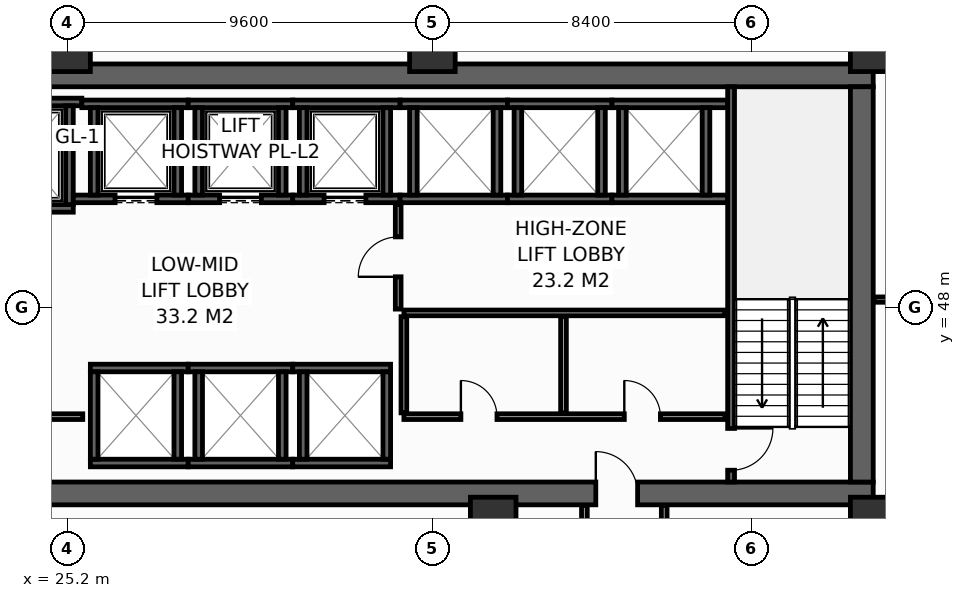
"""IFC4 building model, lengths in metres.
Left out: names, types, materials, properties, quantities, classifications, styles, units other than length and angle.
Written with IfcOpenShell. Run it as: python <this file> out.ifc"""

import sys

from ifc_helpers import new_model, si_unit, direction, frame, frame_2d, origin, origin_2d, place, context, subcontext, project, spatial, rectangle, hollow_rectangle, extrude, element, fill, save


model = new_model("IFC4")
c1 = context("Model", 3, precision=1e-05, world=origin(), true_north=direction((0.0, 1.0)))
c2 = subcontext(c1, "Body", "Model", "MODEL_VIEW")
j1 = project(units=[si_unit("LENGTHUNIT", "METRE"), si_unit("PLANEANGLEUNIT", "RADIAN")], contexts=[c1])
p1 = place(None, origin())
s1 = spatial("IfcSite", under=j1, at=p1, CompositionType="ELEMENT")
p2 = place(p1, origin())
s2 = spatial("IfcBuilding", under=s1, at=p2, CompositionType="ELEMENT")
p3 = place(p2, frame((0.0, 0.0, 56.0)))
s3 = spatial("IfcBuildingStorey", under=s2, at=p3, CompositionType="ELEMENT", Elevation=56.0)
p4 = place(p3, frame((13.5, 43.1, 0.0), z_axis=(0.0, 0.0, 1.0), x_axis=(1.0, 0.0, 0.0)))
e1 = element("IfcWall", 1, at=p4, inside=s3, PredefinedType="SHEAR", context=c2, shape_type="SweptSolid", body=[
    extrude(rectangle(XDim=32.9, YDim=0.6, at=frame_2d((16.45, 0.0))), origin(), (0.0, 0.0, 1.0), 4.15),
])
p5 = place(p4, frame((5.4, 0.0, 0.0)))
e2 = element("IfcOpeningElement", 2, at=p5, cuts=e1, PredefinedType="OPENING", context=c2, shape_type="SweptSolid", body=[
    extrude(rectangle(XDim=1.1, YDim=2.15, at=frame_2d((0.55, 1.075))), frame((0.0, 0.31, 0.0), z_axis=(0.0, -1.0, 0.0), x_axis=(1.0, 0.0, 0.0)), (0.0, 0.0, 1.0), 0.62),
])
p6 = place(p4, frame((25.6, 0.0, 0.0)))
e3 = element("IfcOpeningElement", 3, at=p6, cuts=e1, PredefinedType="OPENING", context=c2, shape_type="SweptSolid", body=[
    extrude(rectangle(XDim=1.1, YDim=2.15, at=frame_2d((0.55, 1.075))), frame((0.0, 0.31, 0.0), z_axis=(0.0, -1.0, 0.0), x_axis=(1.0, 0.0, 0.0)), (0.0, 0.0, 1.0), 0.62),
])
p7 = place(p3, frame((13.5, 54.1, 0.0), z_axis=(0.0, 0.0, 1.0), x_axis=(1.0, 0.0, 0.0)))
e4 = element("IfcWall", 4, at=p7, inside=s3, PredefinedType="SHEAR", context=c2, shape_type="SweptSolid", body=[
    extrude(rectangle(XDim=32.9, YDim=0.6, at=frame_2d((16.45, 0.0))), origin(), (0.0, 0.0, 1.0), 4.15),
])
p8 = place(p3, frame((46.1, 43.4, 0.0), z_axis=(0.0, 0.0, 1.0), x_axis=(0.0, 1.0, 0.0)))
e5 = element("IfcWall", 5, at=p8, inside=s3, PredefinedType="SHEAR", context=c2, shape_type="SweptSolid", body=[
    extrude(rectangle(XDim=10.4, YDim=0.6, at=frame_2d((5.2, 0.0))), origin(), (0.0, 0.0, 1.0), 4.15),
])
for number, where, z_axis, x_axis in (
    (6, (25.2, 54.8, 0.0), (0.0, 0.0, 1.0), (1.0, 0.0, 0.0)),
    (7, (34.8, 54.8, 0.0), (0.0, 0.0, 1.0), (1.0, 0.0, 0.0)),
    (8, (46.4, 54.8, 0.0), (0.0, 0.0, 1.0), (1.0, 0.0, 0.0)),
    (9, (36.4, 42.4, 0.0), (0.0, 0.0, 1.0), (1.0, 0.0, 0.0)),
    (10, (46.4, 42.4, 0.0), (0.0, 0.0, 1.0), (1.0, 0.0, 0.0)),
):
    element("IfcColumn", number, at=place(p3, frame(where, z_axis=z_axis, x_axis=x_axis)), inside=s3, PredefinedType="COLUMN", context=c2, shape_type="SweptSolid", body=[
        extrude(hollow_rectangle(XDim=1.2, YDim=1.2, WallThickness=0.055, at=origin_2d()), origin(), (0.0, 0.0, 1.0), 4.4),
    ])
p9 = place(p3, frame((22.5, 50.6, 0.0), z_axis=(0.0, 0.0, 1.0), x_axis=(1.0, 0.0, 0.0)))
e11 = element("IfcWall", 11, at=p9, inside=s3, PredefinedType="SHEAR", context=c2, shape_type="SweptSolid", body=[
    extrude(rectangle(XDim=2.85, YDim=0.2, at=frame_2d((1.425, 0.0))), origin(), (0.0, 0.0, 1.0), 4.15),
])
p10 = place(p9, frame((0.925, 0.0, 0.0)))
e12 = element("IfcOpeningElement", 12, at=p10, cuts=e11, PredefinedType="OPENING", context=c2, shape_type="SweptSolid", body=[
    extrude(rectangle(XDim=1.25, YDim=2.3, at=frame_2d((0.625, 1.15))), frame((0.0, 0.11, 0.0), z_axis=(0.0, -1.0, 0.0), x_axis=(1.0, 0.0, 0.0)), (0.0, 0.0, 1.0), 0.22),
])
p11 = place(p3, frame((22.5, 53.4, 0.0), z_axis=(0.0, 0.0, 1.0), x_axis=(1.0, 0.0, 0.0)))
e13 = element("IfcWall", 13, at=p11, inside=s3, PredefinedType="SHEAR", context=c2, shape_type="SweptSolid", body=[
    extrude(rectangle(XDim=3.075, YDim=0.2, at=frame_2d((1.538, 0.0))), origin(), (0.0, 0.0, 1.0), 4.15),
])
p12 = place(p3, frame((25.25, 50.7, 0.0), z_axis=(0.0, 0.0, 1.0), x_axis=(0.0, 1.0, 0.0)))
e14 = element("IfcWall", 14, at=p12, inside=s3, PredefinedType="SHEAR", context=c2, shape_type="SweptSolid", body=[
    extrude(rectangle(XDim=2.6, YDim=0.2, at=frame_2d((1.3, 0.0))), origin(), (0.0, 0.0, 1.0), 4.15),
])
p13 = place(p3, frame((25.35, 50.85, 0.0), z_axis=(0.0, 0.0, 1.0), x_axis=(1.0, 0.0, 0.0)))
e15 = element("IfcWall", 15, at=p13, inside=s3, PredefinedType="SHEAR", context=c2, shape_type="SweptSolid", body=[
    extrude(rectangle(XDim=3.025, YDim=0.2, at=frame_2d((1.512, 0.0))), origin(), (0.0, 0.0, 1.0), 4.15),
])
p14 = place(p13, frame((1.1, 0.0, 0.0)))
e16 = element("IfcOpeningElement", 16, at=p14, cuts=e15, PredefinedType="OPENING", context=c2, shape_type="SweptSolid", body=[
    extrude(rectangle(XDim=1.1, YDim=2.2, at=frame_2d((0.55, 1.1))), frame((0.0, 0.11, 0.0), z_axis=(0.0, -1.0, 0.0), x_axis=(1.0, 0.0, 0.0)), (0.0, 0.0, 1.0), 0.22),
])
p15 = place(p3, frame((25.575, 53.35, 0.0), z_axis=(0.0, 0.0, 1.0), x_axis=(1.0, 0.0, 0.0)))
e17 = element("IfcWall", 17, at=p15, inside=s3, PredefinedType="SHEAR", context=c2, shape_type="SweptSolid", body=[
    extrude(rectangle(XDim=2.8, YDim=0.2, at=frame_2d((1.4, 0.0))), origin(), (0.0, 0.0, 1.0), 4.15),
])
for number, where, z_axis, x_axis in (
    (18, (25.9, 50.95, 0.0), (0.0, 0.0, 1.0), (0.0, 1.0, 0.0)),
    (19, (28.1, 50.95, 0.0), (0.0, 0.0, 1.0), (0.0, 1.0, 0.0)),
):
    element("IfcWall", number, at=place(p3, frame(where, z_axis=z_axis, x_axis=x_axis)), inside=s3, PredefinedType="SHEAR", context=c2, shape_type="SweptSolid", body=[
        extrude(rectangle(XDim=2.3, YDim=0.2, at=frame_2d((1.15, 0.0))), origin(), (0.0, 0.0, 1.0), 4.15),
    ])
p16 = place(p3, frame((28.375, 50.85, 0.0), z_axis=(0.0, 0.0, 1.0), x_axis=(1.0, 0.0, 0.0)))
e20 = element("IfcWall", 20, at=p16, inside=s3, PredefinedType="SHEAR", context=c2, shape_type="SweptSolid", body=[
    extrude(rectangle(XDim=2.75, YDim=0.2, at=frame_2d((1.375, 0.0))), origin(), (0.0, 0.0, 1.0), 4.15),
])
p17 = place(p16, frame((0.825, 0.0, 0.0)))
e21 = element("IfcOpeningElement", 21, at=p17, cuts=e20, PredefinedType="OPENING", context=c2, shape_type="SweptSolid", body=[
    extrude(rectangle(XDim=1.1, YDim=2.2, at=frame_2d((0.55, 1.1))), frame((0.0, 0.11, 0.0), z_axis=(0.0, -1.0, 0.0), x_axis=(1.0, 0.0, 0.0)), (0.0, 0.0, 1.0), 0.22),
])
p18 = place(p3, frame((28.375, 53.35, 0.0), z_axis=(0.0, 0.0, 1.0), x_axis=(1.0, 0.0, 0.0)))
e22 = element("IfcWall", 22, at=p18, inside=s3, PredefinedType="SHEAR", context=c2, shape_type="SweptSolid", body=[
    extrude(rectangle(XDim=2.75, YDim=0.2, at=frame_2d((1.375, 0.0))), origin(), (0.0, 0.0, 1.0), 4.15),
])
for number, where, z_axis, x_axis in (
    (23, (28.65, 50.95, 0.0), (0.0, 0.0, 1.0), (0.0, 1.0, 0.0)),
    (24, (30.85, 50.95, 0.0), (0.0, 0.0, 1.0), (0.0, 1.0, 0.0)),
):
    element("IfcWall", number, at=place(p3, frame(where, z_axis=z_axis, x_axis=x_axis)), inside=s3, PredefinedType="SHEAR", context=c2, shape_type="SweptSolid", body=[
        extrude(rectangle(XDim=2.3, YDim=0.2, at=frame_2d((1.15, 0.0))), origin(), (0.0, 0.0, 1.0), 4.15),
    ])
p19 = place(p3, frame((31.125, 50.85, 0.0), z_axis=(0.0, 0.0, 1.0), x_axis=(1.0, 0.0, 0.0)))
e25 = element("IfcWall", 25, at=p19, inside=s3, PredefinedType="SHEAR", context=c2, shape_type="SweptSolid", body=[
    extrude(rectangle(XDim=2.825, YDim=0.2, at=frame_2d((1.413, 0.0))), origin(), (0.0, 0.0, 1.0), 4.15),
])
p20 = place(p19, frame((0.825, 0.0, 0.0)))
e26 = element("IfcOpeningElement", 26, at=p20, cuts=e25, PredefinedType="OPENING", context=c2, shape_type="SweptSolid", body=[
    extrude(rectangle(XDim=1.1, YDim=2.2, at=frame_2d((0.55, 1.1))), frame((0.0, 0.11, 0.0), z_axis=(0.0, -1.0, 0.0), x_axis=(1.0, 0.0, 0.0)), (0.0, 0.0, 1.0), 0.22),
])
p21 = place(p3, frame((31.125, 53.35, 0.0), z_axis=(0.0, 0.0, 1.0), x_axis=(1.0, 0.0, 0.0)))
e27 = element("IfcWall", 27, at=p21, inside=s3, PredefinedType="SHEAR", context=c2, shape_type="SweptSolid", body=[
    extrude(rectangle(XDim=2.825, YDim=0.2, at=frame_2d((1.413, 0.0))), origin(), (0.0, 0.0, 1.0), 4.15),
])
for number, where, z_axis, x_axis in (
    (28, (31.4, 50.95, 0.0), (0.0, 0.0, 1.0), (0.0, 1.0, 0.0)),
    (29, (33.6, 50.95, 0.0), (0.0, 0.0, 1.0), (0.0, 1.0, 0.0)),
):
    element("IfcWall", number, at=place(p3, frame(where, z_axis=z_axis, x_axis=x_axis)), inside=s3, PredefinedType="SHEAR", context=c2, shape_type="SweptSolid", body=[
        extrude(rectangle(XDim=2.3, YDim=0.2, at=frame_2d((1.15, 0.0))), origin(), (0.0, 0.0, 1.0), 4.15),
    ])
for number, where, z_axis, x_axis in (
    (30, (25.8, 43.9, 0.0), (0.0, 0.0, 1.0), (1.0, 0.0, 0.0)),
    (31, (25.8, 46.4, 0.0), (0.0, 0.0, 1.0), (1.0, 0.0, 0.0)),
):
    element("IfcWall", number, at=place(p3, frame(where, z_axis=z_axis, x_axis=x_axis)), inside=s3, PredefinedType="SHEAR", context=c2, shape_type="SweptSolid", body=[
        extrude(rectangle(XDim=2.575, YDim=0.2, at=frame_2d((1.288, 0.0))), origin(), (0.0, 0.0, 1.0), 4.15),
    ])
for number, where, z_axis, x_axis in (
    (32, (25.9, 44.0, 0.0), (0.0, 0.0, 1.0), (0.0, 1.0, 0.0)),
    (33, (28.1, 44.0, 0.0), (0.0, 0.0, 1.0), (0.0, 1.0, 0.0)),
):
    element("IfcWall", number, at=place(p3, frame(where, z_axis=z_axis, x_axis=x_axis)), inside=s3, PredefinedType="SHEAR", context=c2, shape_type="SweptSolid", body=[
        extrude(rectangle(XDim=2.3, YDim=0.2, at=frame_2d((1.15, 0.0))), origin(), (0.0, 0.0, 1.0), 4.15),
    ])
for number, where, z_axis, x_axis in (
    (34, (28.375, 43.9, 0.0), (0.0, 0.0, 1.0), (1.0, 0.0, 0.0)),
    (35, (28.375, 46.4, 0.0), (0.0, 0.0, 1.0), (1.0, 0.0, 0.0)),
):
    element("IfcWall", number, at=place(p3, frame(where, z_axis=z_axis, x_axis=x_axis)), inside=s3, PredefinedType="SHEAR", context=c2, shape_type="SweptSolid", body=[
        extrude(rectangle(XDim=2.75, YDim=0.2, at=frame_2d((1.375, 0.0))), origin(), (0.0, 0.0, 1.0), 4.15),
    ])
for number, where, z_axis, x_axis in (
    (36, (28.65, 44.0, 0.0), (0.0, 0.0, 1.0), (0.0, 1.0, 0.0)),
    (37, (30.85, 44.0, 0.0), (0.0, 0.0, 1.0), (0.0, 1.0, 0.0)),
):
    element("IfcWall", number, at=place(p3, frame(where, z_axis=z_axis, x_axis=x_axis)), inside=s3, PredefinedType="SHEAR", context=c2, shape_type="SweptSolid", body=[
        extrude(rectangle(XDim=2.3, YDim=0.2, at=frame_2d((1.15, 0.0))), origin(), (0.0, 0.0, 1.0), 4.15),
    ])
for number, where, z_axis, x_axis in (
    (38, (31.125, 43.9, 0.0), (0.0, 0.0, 1.0), (1.0, 0.0, 0.0)),
    (39, (31.125, 46.4, 0.0), (0.0, 0.0, 1.0), (1.0, 0.0, 0.0)),
):
    element("IfcWall", number, at=place(p3, frame(where, z_axis=z_axis, x_axis=x_axis)), inside=s3, PredefinedType="SHEAR", context=c2, shape_type="SweptSolid", body=[
        extrude(rectangle(XDim=2.575, YDim=0.2, at=frame_2d((1.288, 0.0))), origin(), (0.0, 0.0, 1.0), 4.15),
    ])
for number, where, z_axis, x_axis in (
    (40, (31.4, 44.0, 0.0), (0.0, 0.0, 1.0), (0.0, 1.0, 0.0)),
    (41, (33.6, 44.0, 0.0), (0.0, 0.0, 1.0), (0.0, 1.0, 0.0)),
):
    element("IfcWall", number, at=place(p3, frame(where, z_axis=z_axis, x_axis=x_axis)), inside=s3, PredefinedType="SHEAR", context=c2, shape_type="SweptSolid", body=[
        extrude(rectangle(XDim=2.3, YDim=0.2, at=frame_2d((1.15, 0.0))), origin(), (0.0, 0.0, 1.0), 4.15),
    ])
for number, where, z_axis, x_axis in (
    (42, (33.95, 50.85, 0.0), (0.0, 0.0, 1.0), (1.0, 0.0, 0.0)),
    (43, (33.95, 53.35, 0.0), (0.0, 0.0, 1.0), (1.0, 0.0, 0.0)),
):
    element("IfcWall", number, at=place(p3, frame(where, z_axis=z_axis, x_axis=x_axis)), inside=s3, PredefinedType="SHEAR", context=c2, shape_type="SweptSolid", body=[
        extrude(rectangle(XDim=2.825, YDim=0.2, at=frame_2d((1.413, 0.0))), origin(), (0.0, 0.0, 1.0), 4.15),
    ])
for number, where, z_axis, x_axis in (
    (44, (34.3, 50.95, 0.0), (0.0, 0.0, 1.0), (0.0, 1.0, 0.0)),
    (45, (36.5, 50.95, 0.0), (0.0, 0.0, 1.0), (0.0, 1.0, 0.0)),
):
    element("IfcWall", number, at=place(p3, frame(where, z_axis=z_axis, x_axis=x_axis)), inside=s3, PredefinedType="SHEAR", context=c2, shape_type="SweptSolid", body=[
        extrude(rectangle(XDim=2.3, YDim=0.2, at=frame_2d((1.15, 0.0))), origin(), (0.0, 0.0, 1.0), 4.15),
    ])
for number, where, z_axis, x_axis in (
    (46, (36.775, 50.85, 0.0), (0.0, 0.0, 1.0), (1.0, 0.0, 0.0)),
    (47, (36.775, 53.35, 0.0), (0.0, 0.0, 1.0), (1.0, 0.0, 0.0)),
):
    element("IfcWall", number, at=place(p3, frame(where, z_axis=z_axis, x_axis=x_axis)), inside=s3, PredefinedType="SHEAR", context=c2, shape_type="SweptSolid", body=[
        extrude(rectangle(XDim=2.75, YDim=0.2, at=frame_2d((1.375, 0.0))), origin(), (0.0, 0.0, 1.0), 4.15),
    ])
for number, where, z_axis, x_axis in (
    (48, (37.05, 50.95, 0.0), (0.0, 0.0, 1.0), (0.0, 1.0, 0.0)),
    (49, (39.25, 50.95, 0.0), (0.0, 0.0, 1.0), (0.0, 1.0, 0.0)),
):
    element("IfcWall", number, at=place(p3, frame(where, z_axis=z_axis, x_axis=x_axis)), inside=s3, PredefinedType="SHEAR", context=c2, shape_type="SweptSolid", body=[
        extrude(rectangle(XDim=2.3, YDim=0.2, at=frame_2d((1.15, 0.0))), origin(), (0.0, 0.0, 1.0), 4.15),
    ])
for number, where, z_axis, x_axis in (
    (50, (39.525, 50.85, 0.0), (0.0, 0.0, 1.0), (1.0, 0.0, 0.0)),
    (51, (39.525, 53.35, 0.0), (0.0, 0.0, 1.0), (1.0, 0.0, 0.0)),
):
    element("IfcWall", number, at=place(p3, frame(where, z_axis=z_axis, x_axis=x_axis)), inside=s3, PredefinedType="SHEAR", context=c2, shape_type="SweptSolid", body=[
        extrude(rectangle(XDim=3.045, YDim=0.2, at=frame_2d((1.522, 0.0))), origin(), (0.0, 0.0, 1.0), 4.15),
    ])
for number, where, z_axis, x_axis in (
    (52, (39.8, 50.95, 0.0), (0.0, 0.0, 1.0), (0.0, 1.0, 0.0)),
    (53, (42.0, 50.95, 0.0), (0.0, 0.0, 1.0), (0.0, 1.0, 0.0)),
):
    element("IfcWall", number, at=place(p3, frame(where, z_axis=z_axis, x_axis=x_axis)), inside=s3, PredefinedType="SHEAR", context=c2, shape_type="SweptSolid", body=[
        extrude(rectangle(XDim=2.3, YDim=0.2, at=frame_2d((1.15, 0.0))), origin(), (0.0, 0.0, 1.0), 4.15),
    ])
p22 = place(p3, frame((42.66, 53.8, 0.0), z_axis=(0.0, 0.0, 1.0), x_axis=(0.0, -1.0, 0.0)))
e54 = element("IfcWall", 54, at=p22, inside=s3, PredefinedType="SHEAR", context=c2, shape_type="SweptSolid", body=[
    extrude(rectangle(XDim=10.4, YDim=0.18, at=frame_2d((5.2, 0.0))), origin(), (0.0, 0.0, 1.0), 4.15),
])
p23 = place(p22, frame((8.99, 0.0, 0.0)))
e55 = element("IfcOpeningElement", 55, at=p23, cuts=e54, PredefinedType="OPENING", context=c2, shape_type="SweptSolid", body=[
    extrude(rectangle(XDim=1.1, YDim=2.15, at=frame_2d((0.55, 1.075))), frame((0.0, 0.1, 0.0), z_axis=(0.0, -1.0, 0.0), x_axis=(1.0, 0.0, 0.0)), (0.0, 0.0, 1.0), 0.2),
])
p24 = place(p3, frame((22.68, 45.12, 0.0), z_axis=(0.0, 0.0, 1.0), x_axis=(1.0, 0.0, 0.0)))
e56 = element("IfcWall", 56, at=p24, inside=s3, PredefinedType="PARTITIONING", context=c2, shape_type="SweptSolid", body=[
    extrude(rectangle(XDim=2.92, YDim=0.15, at=frame_2d((1.46, 0.0))), origin(), (0.0, 0.0, 1.0), 4.15),
])
p25 = place(p24, frame((0.85, 0.0, 0.0)))
e57 = element("IfcOpeningElement", 57, at=p25, cuts=e56, PredefinedType="OPENING", context=c2, shape_type="SweptSolid", body=[
    extrude(rectangle(XDim=1.1, YDim=2.15, at=frame_2d((0.55, 1.075))), frame((0.0, 0.085, 0.0), z_axis=(0.0, -1.0, 0.0), x_axis=(1.0, 0.0, 0.0)), (0.0, 0.0, 1.0), 0.17),
])
p26 = place(p3, frame((33.9, 47.95, 0.0), z_axis=(0.0, 0.0, 1.0), x_axis=(0.0, 1.0, 0.0)))
e58 = element("IfcWall", 58, at=p26, inside=s3, PredefinedType="PARTITIONING", context=c2, shape_type="SweptSolid", body=[
    extrude(rectangle(XDim=2.75, YDim=0.15, at=frame_2d((1.375, 0.0))), origin(), (0.0, 0.0, 1.0), 4.15),
])
p27 = place(p26, frame((0.85, 0.0, 0.0)))
e59 = element("IfcOpeningElement", 59, at=p27, cuts=e58, PredefinedType="OPENING", context=c2, shape_type="SweptSolid", body=[
    extrude(rectangle(XDim=1.05, YDim=2.15, at=frame_2d((0.525, 1.075))), frame((0.0, 0.085, 0.0), z_axis=(0.0, -1.0, 0.0), x_axis=(1.0, 0.0, 0.0)), (0.0, 0.0, 1.0), 0.17),
])
p28 = place(p3, frame((34.05, 45.12, 0.0), z_axis=(0.0, 0.0, 1.0), x_axis=(1.0, 0.0, 0.0)))
e60 = element("IfcWall", 60, at=p28, inside=s3, PredefinedType="PARTITIONING", context=c2, shape_type="SweptSolid", body=[
    extrude(rectangle(XDim=8.45, YDim=0.15, at=frame_2d((4.225, 0.0))), origin(), (0.0, 0.0, 1.0), 4.15),
])
p29 = place(p28, frame((1.5, 0.0, 0.0)))
e61 = element("IfcOpeningElement", 61, at=p29, cuts=e60, PredefinedType="OPENING", context=c2, shape_type="SweptSolid", body=[
    extrude(rectangle(XDim=0.95, YDim=2.15, at=frame_2d((0.475, 1.075))), frame((0.0, 0.085, 0.0), z_axis=(0.0, -1.0, 0.0), x_axis=(1.0, 0.0, 0.0)), (0.0, 0.0, 1.0), 0.17),
])
p30 = place(p28, frame((5.8, 0.0, 0.0)))
e62 = element("IfcOpeningElement", 62, at=p30, cuts=e60, PredefinedType="OPENING", context=c2, shape_type="SweptSolid", body=[
    extrude(rectangle(XDim=0.95, YDim=2.15, at=frame_2d((0.475, 1.075))), frame((0.0, 0.085, 0.0), z_axis=(0.0, -1.0, 0.0), x_axis=(1.0, 0.0, 0.0)), (0.0, 0.0, 1.0), 0.17),
])
p31 = place(p3, frame((34.05, 47.85, 0.0), z_axis=(0.0, 0.0, 1.0), x_axis=(1.0, 0.0, 0.0)))
e63 = element("IfcWall", 63, at=p31, inside=s3, PredefinedType="PARTITIONING", context=c2, shape_type="SweptSolid", body=[
    extrude(rectangle(XDim=8.45, YDim=0.15, at=frame_2d((4.225, 0.0))), origin(), (0.0, 0.0, 1.0), 4.15),
])
for number, where, z_axis, x_axis in (
    (64, (38.25, 45.22, 0.0), (0.0, 0.0, 1.0), (0.0, 1.0, 0.0)),
    (65, (34.05, 45.22, 0.0), (0.0, 0.0, 1.0), (0.0, 1.0, 0.0)),
):
    element("IfcWall", number, at=place(p3, frame(where, z_axis=z_axis, x_axis=x_axis)), inside=s3, PredefinedType="PARTITIONING", context=c2, shape_type="SweptSolid", body=[
        extrude(rectangle(XDim=2.53, YDim=0.15, at=frame_2d((1.265, 0.0))), origin(), (0.0, 0.0, 1.0), 4.15),
    ])
p32 = place(p3, frame((46.15, 41.24, 0.0), z_axis=(0.0, 0.0, 1.0), x_axis=(0.0, 1.0, 0.0)))
e66 = element("IfcWall", 66, at=p32, inside=s3, PredefinedType="PARTITIONING", context=c2, shape_type="SweptSolid", body=[
    extrude(rectangle(XDim=1.54, YDim=0.14, at=frame_2d((0.77, 0.0))), origin(), (0.0, 0.0, 1.0), 4.15),
])
p33 = place(p3, frame((46.42, 48.2, 0.0), z_axis=(0.0, 0.0, 1.0), x_axis=(1.0, 0.0, 0.0)))
e67 = element("IfcWall", 67, at=p33, inside=s3, PredefinedType="PARTITIONING", context=c2, shape_type="SweptSolid", body=[
    extrude(rectangle(XDim=3.78, YDim=0.14, at=frame_2d((1.89, 0.0))), origin(), (0.0, 0.0, 1.0), 4.15),
])
for number, where, z_axis, x_axis in (
    (68, (38.8, 41.15, 0.0), (0.0, 0.0, 1.0), (0.0, 1.0, 0.0)),
    (69, (40.9, 41.15, 0.0), (0.0, 0.0, 1.0), (0.0, 1.0, 0.0)),
):
    element("IfcWall", number, at=place(p3, frame(where, z_axis=z_axis, x_axis=x_axis)), inside=s3, PredefinedType="PARTITIONING", context=c2, shape_type="SweptSolid", body=[
        extrude(rectangle(XDim=1.63, YDim=0.15, at=frame_2d((0.815, 0.0))), origin(), (0.0, 0.0, 1.0), 4.15),
    ])
p34 = place(p14, origin())
e70 = element("IfcDoor", 70, at=p34, inside=s3, OperationType="SLIDING_TO_LEFT", PredefinedType="DOOR", context=c2, shape_type="SweptSolid", body=[
    extrude(rectangle(XDim=1.1, YDim=2.2, at=frame_2d((0.55, 1.1))), frame((0.0, 0.025, 0.0), z_axis=(0.0, -1.0, 0.0), x_axis=(1.0, 0.0, 0.0)), (0.0, 0.0, 1.0), 0.05),
])
fill(e16, e70)
p35 = place(p17, origin())
e71 = element("IfcDoor", 71, at=p35, inside=s3, OperationType="SLIDING_TO_LEFT", PredefinedType="DOOR", context=c2, shape_type="SweptSolid", body=[
    extrude(rectangle(XDim=1.1, YDim=2.2, at=frame_2d((0.55, 1.1))), frame((0.0, 0.025, 0.0), z_axis=(0.0, -1.0, 0.0), x_axis=(1.0, 0.0, 0.0)), (0.0, 0.0, 1.0), 0.05),
])
fill(e21, e71)
p36 = place(p20, origin())
e72 = element("IfcDoor", 72, at=p36, inside=s3, OperationType="SLIDING_TO_LEFT", PredefinedType="DOOR", context=c2, shape_type="SweptSolid", body=[
    extrude(rectangle(XDim=1.1, YDim=2.2, at=frame_2d((0.55, 1.1))), frame((0.0, 0.025, 0.0), z_axis=(0.0, -1.0, 0.0), x_axis=(1.0, 0.0, 0.0)), (0.0, 0.0, 1.0), 0.05),
])
fill(e26, e72)
p37 = place(p23, origin())
e73 = element("IfcDoor", 73, at=p37, inside=s3, OperationType="SINGLE_SWING_LEFT", PredefinedType="DOOR", context=c2, shape_type="SweptSolid", body=[
    extrude(rectangle(XDim=1.1, YDim=2.15, at=frame_2d((0.55, 1.075))), frame((0.0, 0.025, 0.0), z_axis=(0.0, -1.0, 0.0), x_axis=(1.0, 0.0, 0.0)), (0.0, 0.0, 1.0), 0.05),
])
fill(e55, e73)
p38 = place(p6, origin())
e74 = element("IfcDoor", 74, at=p38, inside=s3, OperationType="SINGLE_SWING_LEFT", PredefinedType="DOOR", context=c2, shape_type="SweptSolid", body=[
    extrude(rectangle(XDim=1.1, YDim=2.15, at=frame_2d((0.55, 1.075))), frame((0.0, 0.025, 0.0), z_axis=(0.0, -1.0, 0.0), x_axis=(1.0, 0.0, 0.0)), (0.0, 0.0, 1.0), 0.05),
])
fill(e3, e74)
p39 = place(p27, origin())
e75 = element("IfcDoor", 75, at=p39, inside=s3, OperationType="SINGLE_SWING_LEFT", PredefinedType="DOOR", context=c2, shape_type="SweptSolid", body=[
    extrude(rectangle(XDim=1.05, YDim=2.15, at=frame_2d((0.525, 1.075))), frame((0.0, 0.025, 0.0), z_axis=(0.0, -1.0, 0.0), x_axis=(1.0, 0.0, 0.0)), (0.0, 0.0, 1.0), 0.05),
])
fill(e59, e75)
p40 = place(p29, origin())
e76 = element("IfcDoor", 76, at=p40, inside=s3, OperationType="SINGLE_SWING_LEFT", PredefinedType="DOOR", context=c2, shape_type="SweptSolid", body=[
    extrude(rectangle(XDim=0.95, YDim=2.15, at=frame_2d((0.475, 1.075))), frame((0.0, 0.025, 0.0), z_axis=(0.0, -1.0, 0.0), x_axis=(1.0, 0.0, 0.0)), (0.0, 0.0, 1.0), 0.05),
])
fill(e61, e76)
p41 = place(p30, origin())
e77 = element("IfcDoor", 77, at=p41, inside=s3, OperationType="SINGLE_SWING_LEFT", PredefinedType="DOOR", context=c2, shape_type="SweptSolid", body=[
    extrude(rectangle(XDim=0.95, YDim=2.15, at=frame_2d((0.475, 1.075))), frame((0.0, 0.025, 0.0), z_axis=(0.0, -1.0, 0.0), x_axis=(1.0, 0.0, 0.0)), (0.0, 0.0, 1.0), 0.05),
])
fill(e62, e77)
save(model, sys.argv[1])
